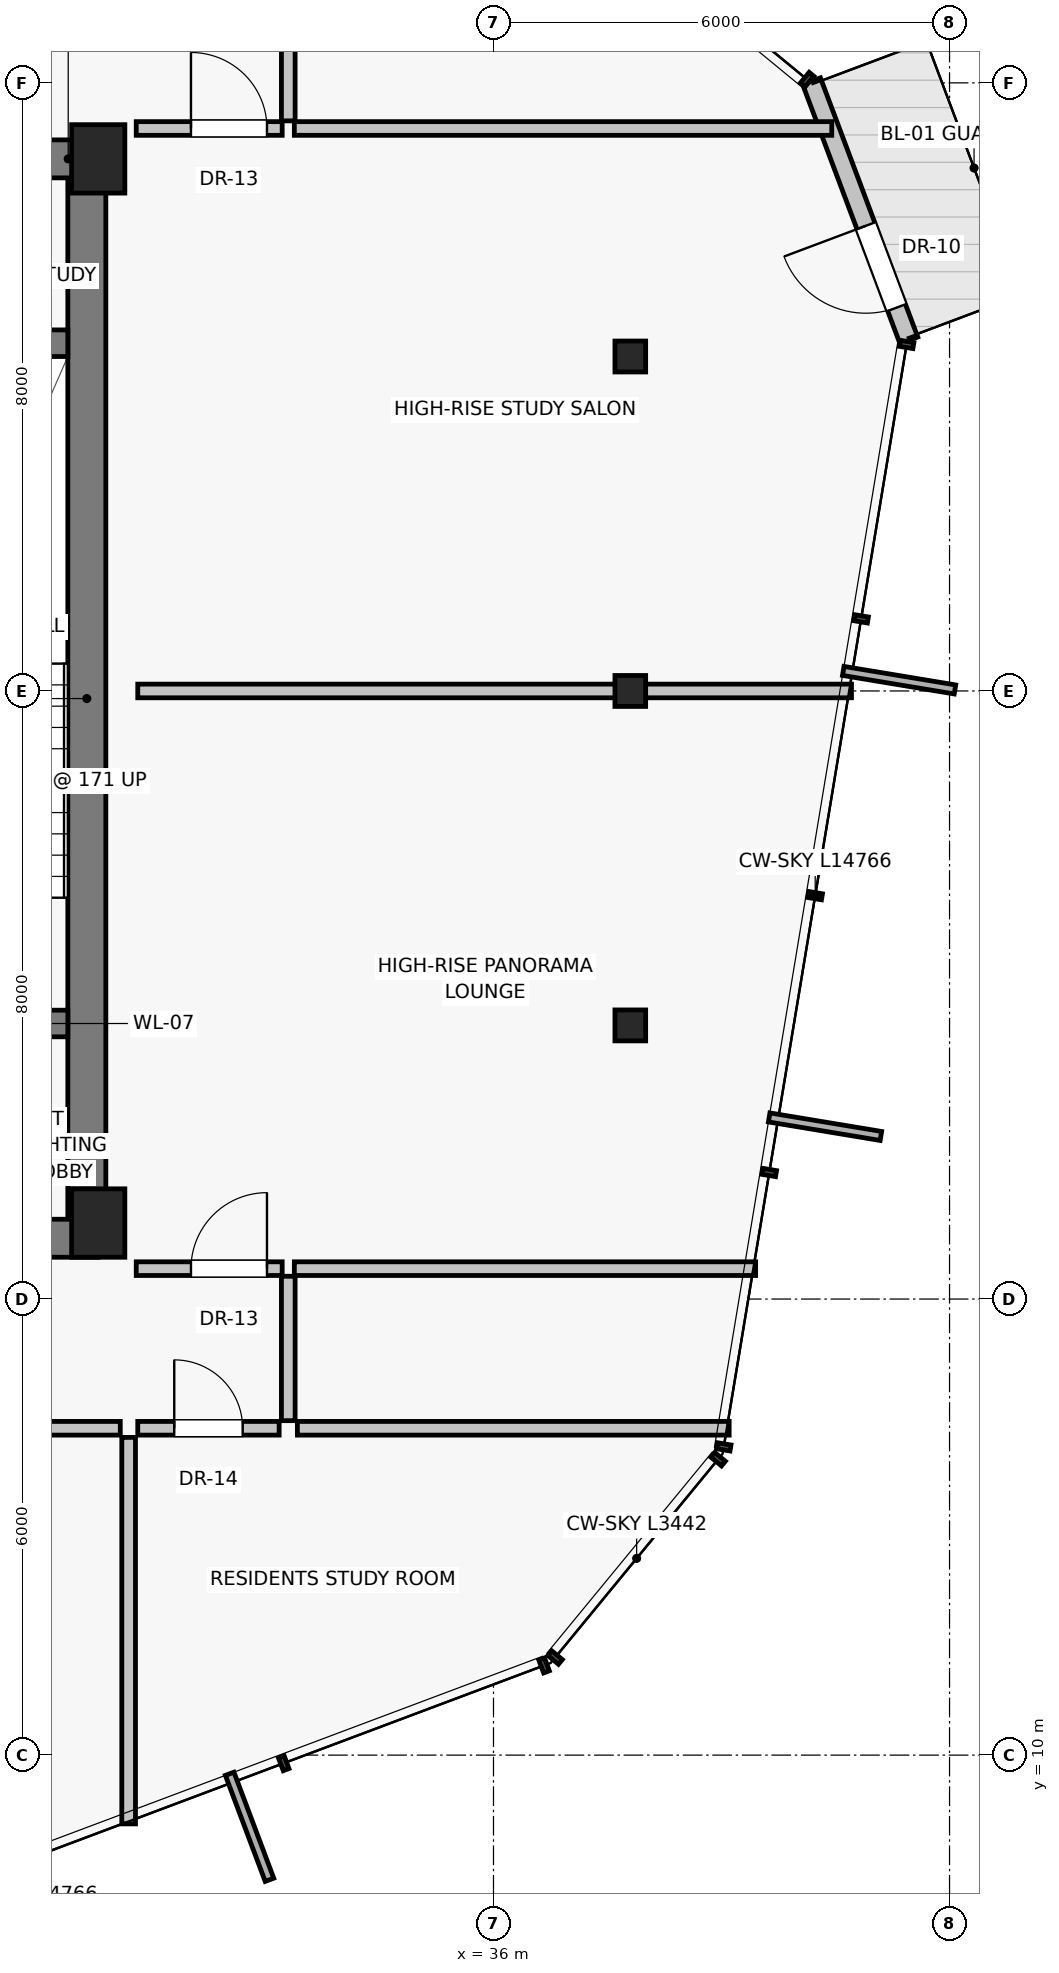
"""IFC4 building model, lengths in metres.
Left out: names, types, materials, properties, quantities, classifications, styles, units other than length and angle.
Written with IfcOpenShell. Run it as: python <this file> out.ifc"""

import sys

from ifc_helpers import new_model, si_unit, direction, frame, frame_2d, origin, origin_2d, place, context, subcontext, project, spatial, rectangle, i_section, extrude, source, transform, mapped, element, fill, save


model = new_model("IFC4")
c1 = context("Model", 3, precision=1e-05, world=origin(), true_north=direction((0.0, 1.0)))
c2 = subcontext(c1, "Body", "Model", "MODEL_VIEW")
j1 = project(units=[si_unit("LENGTHUNIT", "METRE"), si_unit("PLANEANGLEUNIT", "RADIAN")], contexts=[c1])
p1 = place(None, origin())
s1 = spatial("IfcSite", under=j1, at=p1, CompositionType="ELEMENT")
p2 = place(p1, origin())
s2 = spatial("IfcBuilding", under=s1, at=p2, CompositionType="ELEMENT")
p3 = place(p2, frame((0.0, 0.0, 240.65)))
s3 = spatial("IfcBuildingStorey", under=s2, at=p3, CompositionType="ELEMENT", Elevation=240.65)
for number, where, z_axis, x_axis in (
    (1, (30.8, 17.0, 0.0), (0.0, 0.0, 1.0), (1.0, 0.0, 0.0)),
    (2, (30.8, 31.0, 0.0), (0.0, 0.0, 1.0), (1.0, 0.0, 0.0)),
):
    element("IfcColumn", number, at=place(p3, frame(where, z_axis=z_axis, x_axis=x_axis)), inside=s3, PredefinedType="PILASTER", context=c2, shape_type="SweptSolid", body=[
        extrude(rectangle(XDim=0.7, YDim=0.9, at=origin_2d()), origin(), (0.0, 0.0, 1.0), 4.1),
    ])
for number, where, z_axis, x_axis in (
    (3, (37.8, 19.6, 0.0), (0.0, 0.0, 1.0), (1.0, 0.0, 0.0)),
    (4, (37.8, 24.0, 0.0), (0.0, 0.0, 1.0), (1.0, 0.0, 0.0)),
    (5, (37.8, 28.4, 0.0), (0.0, 0.0, 1.0), (1.0, 0.0, 0.0)),
):
    element("IfcColumn", number, at=place(p3, frame(where, z_axis=z_axis, x_axis=x_axis)), inside=s3, PredefinedType="COLUMN", context=c2, shape_type="SweptSolid", body=[
        extrude(i_section(OverallWidth=0.404, OverallDepth=0.407, WebThickness=0.025, FlangeThickness=0.04, at=origin_2d()), origin(), (0.0, 0.0, 1.0), 4.1),
    ])
p4 = place(p3, frame((41.465, 28.612, 0.0), z_axis=(0.0, 0.0, 1.0), x_axis=(-0.351498039149, 0.936188618001, 0.0)))
e6 = element("IfcWall", 6, at=p4, inside=s3, PredefinedType="SOLIDWALL", context=c2, shape_type="SweptSolid", body=[
    extrude(rectangle(XDim=3.642, YDim=0.25, at=frame_2d((1.821, 0.0))), origin(), (0.0, 0.0, 1.0), 3.865),
])
p5 = place(p4, frame((0.46, 0.0, 0.0)))
e7 = element("IfcOpeningElement", 7, at=p5, cuts=e6, PredefinedType="OPENING", context=c2, shape_type="SweptSolid", body=[
    extrude(rectangle(XDim=1.15, YDim=2.25, at=frame_2d((0.575, 1.125))), frame((0.0, 0.135, 0.0), z_axis=(0.0, -1.0, 0.0), x_axis=(1.0, 0.0, 0.0)), (0.0, 0.0, 1.0), 0.27),
])
p6 = place(p3, frame((30.65, 16.8, 0.0), z_axis=(0.0, 0.0, 1.0), x_axis=(0.0, 1.0, 0.0)))
e8 = element("IfcWall", 8, at=p6, inside=s3, PredefinedType="SHEAR", context=c2, shape_type="SweptSolid", body=[
    extrude(rectangle(XDim=14.2, YDim=0.5, at=frame_2d((7.1, 0.0))), origin(), (0.0, 0.0, 1.0), 3.865),
])
p7 = place(p3, frame((24.95, 16.8, 0.0), z_axis=(0.0, 0.0, 1.0), x_axis=(1.0, 0.0, 0.0)))
e9 = element("IfcWall", 9, at=p7, inside=s3, PredefinedType="SHEAR", context=c2, shape_type="SweptSolid", body=[
    extrude(rectangle(XDim=5.85, YDim=0.5, at=frame_2d((2.925, 0.0))), origin(), (0.0, 0.0, 1.0), 3.865),
])
p8 = place(p7, frame((2.15, 0.0, 0.0)))
e10 = element("IfcOpeningElement", 10, at=p8, cuts=e9, PredefinedType="OPENING", context=c2, shape_type="SweptSolid", body=[
    extrude(rectangle(XDim=1.2, YDim=2.03, at=frame_2d((0.6, 1.015))), frame((0.0, 0.26, 0.0), z_axis=(0.0, -1.0, 0.0), x_axis=(1.0, 0.0, 0.0)), (0.0, 0.0, 1.0), 0.52),
])
p9 = place(p3, frame((27.0, 31.0, 0.0), z_axis=(0.0, 0.0, 1.0), x_axis=(1.0, 0.0, 0.0)))
e11 = element("IfcWall", 11, at=p9, inside=s3, PredefinedType="SHEAR", context=c2, shape_type="SweptSolid", body=[
    extrude(rectangle(XDim=3.8, YDim=0.5, at=frame_2d((1.9, 0.0))), origin(), (0.0, 0.0, 1.0), 3.865),
])
p10 = place(p9, frame((0.45, 0.0, 0.0)))
e12 = element("IfcOpeningElement", 12, at=p10, cuts=e11, PredefinedType="OPENING", context=c2, shape_type="SweptSolid", body=[
    extrude(rectangle(XDim=0.86, YDim=2.01, at=frame_2d((0.43, 1.005))), frame((0.0, 0.26, 0.0), z_axis=(0.0, -1.0, 0.0), x_axis=(1.0, 0.0, 0.0)), (0.0, 0.0, 1.0), 0.52),
])
p11 = place(p9, frame((1.9, 0.0, 0.0)))
e13 = element("IfcOpeningElement", 13, at=p11, cuts=e11, PredefinedType="OPENING", context=c2, shape_type="SweptSolid", body=[
    extrude(rectangle(XDim=0.86, YDim=2.01, at=frame_2d((0.43, 1.005))), frame((0.0, 0.26, 0.0), z_axis=(0.0, -1.0, 0.0), x_axis=(1.0, 0.0, 0.0)), (0.0, 0.0, 1.0), 0.52),
])
p12 = place(p3, frame((27.025, 19.625, 0.0), z_axis=(0.0, 0.0, 1.0), x_axis=(1.0, 0.0, 0.0)))
e14 = element("IfcWall", 14, at=p12, inside=s3, PredefinedType="SHEAR", context=c2, shape_type="SweptSolid", body=[
    extrude(rectangle(XDim=3.375, YDim=0.35, at=frame_2d((1.688, 0.0))), origin(), (0.0, 0.0, 1.0), 3.865),
])
p13 = place(p12, frame((1.05, 0.0, 0.0)))
e15 = element("IfcOpeningElement", 15, at=p13, cuts=e14, PredefinedType="OPENING", context=c2, shape_type="SweptSolid", body=[
    extrude(rectangle(XDim=1.1, YDim=2.03, at=frame_2d((0.55, 1.015))), frame((0.0, 0.185, 0.0), z_axis=(0.0, -1.0, 0.0), x_axis=(1.0, 0.0, 0.0)), (0.0, 0.0, 1.0), 0.37),
])
p14 = place(p3, frame((27.025, 28.575, 0.0), z_axis=(0.0, 0.0, 1.0), x_axis=(1.0, 0.0, 0.0)))
e16 = element("IfcWall", 16, at=p14, inside=s3, PredefinedType="SHEAR", context=c2, shape_type="SweptSolid", body=[
    extrude(rectangle(XDim=3.375, YDim=0.35, at=frame_2d((1.688, 0.0))), origin(), (0.0, 0.0, 1.0), 3.865),
])
p15 = place(p3, frame((31.2, 14.18, 0.0), z_axis=(0.0, 0.0, 1.0), x_axis=(0.0, -1.0, 0.0)))
e17 = element("IfcWall", 17, at=p15, inside=s3, PredefinedType="PARTITIONING", context=c2, shape_type="SweptSolid", body=[
    extrude(rectangle(XDim=5.085, YDim=0.18, at=frame_2d((2.542, 0.0))), origin(), (0.0, 0.0, 1.0), 3.865),
])
p16 = place(p3, frame((24.43, 14.3, 0.0), z_axis=(0.0, 0.0, 1.0), x_axis=(1.0, 0.0, 0.0)))
e18 = element("IfcWall", 18, at=p16, inside=s3, PredefinedType="PARTITIONING", context=c2, shape_type="SweptSolid", body=[
    extrude(rectangle(XDim=6.66, YDim=0.18, at=frame_2d((3.33, 0.0))), origin(), (0.0, 0.0, 1.0), 3.865),
])
p17 = place(p16, frame((2.83, 0.0, 0.0)))
e19 = element("IfcOpeningElement", 19, at=p17, cuts=e18, PredefinedType="OPENING", context=c2, shape_type="SweptSolid", body=[
    extrude(rectangle(XDim=1.0, YDim=2.01, at=frame_2d((0.5, 1.005))), frame((0.0, 0.1, 0.0), z_axis=(0.0, -1.0, 0.0), x_axis=(1.0, 0.0, 0.0)), (0.0, 0.0, 1.0), 0.2),
])
p18 = place(p3, frame((31.32, 24.0, 0.0), z_axis=(0.0, 0.0, 1.0), x_axis=(1.0, 0.0, 0.0)))
e20 = element("IfcWall", 20, at=p18, inside=s3, PredefinedType="PARTITIONING", context=c2, shape_type="SweptSolid", body=[
    extrude(rectangle(XDim=9.39, YDim=0.18, at=frame_2d((4.695, 0.0))), origin(), (0.0, 0.0, 1.0), 3.865),
])
p19 = place(p3, frame((33.3, 14.4, 0.0), z_axis=(0.0, 0.0, 1.0), x_axis=(0.0, 1.0, 0.0)))
e21 = element("IfcWall", 21, at=p19, inside=s3, PredefinedType="PARTITIONING", context=c2, shape_type="SweptSolid", body=[
    extrude(rectangle(XDim=1.9, YDim=0.18, at=frame_2d((0.95, 0.0))), origin(), (0.0, 0.0, 1.0), 3.865),
])
p20 = place(p3, frame((33.3, 31.5, 0.0), z_axis=(0.0, 0.0, 1.0), x_axis=(0.0, 1.0, 0.0)))
e22 = element("IfcWall", 22, at=p20, inside=s3, PredefinedType="PARTITIONING", context=c2, shape_type="SweptSolid", body=[
    extrude(rectangle(XDim=1.9, YDim=0.18, at=frame_2d((0.95, 0.0))), origin(), (0.0, 0.0, 1.0), 3.865),
])
p21 = place(p3, frame((31.3, 16.4, 0.0), z_axis=(0.0, 0.0, 1.0), x_axis=(1.0, 0.0, 0.0)))
e23 = element("IfcWall", 23, at=p21, inside=s3, PredefinedType="PARTITIONING", context=c2, shape_type="SweptSolid", body=[
    extrude(rectangle(XDim=1.92, YDim=0.18, at=frame_2d((0.96, 0.0))), origin(), (0.0, 0.0, 1.0), 3.865),
])
p22 = place(p21, frame((0.72, 0.0, 0.0)))
e24 = element("IfcOpeningElement", 24, at=p22, cuts=e23, PredefinedType="OPENING", context=c2, shape_type="SweptSolid", body=[
    extrude(rectangle(XDim=1.0, YDim=2.01, at=frame_2d((0.5, 1.005))), frame((0.0, 0.1, 0.0), z_axis=(0.0, -1.0, 0.0), x_axis=(1.0, 0.0, 0.0)), (0.0, 0.0, 1.0), 0.2),
])
p23 = place(p3, frame((33.38, 16.4, 0.0), z_axis=(0.0, 0.0, 1.0), x_axis=(1.0, 0.0, 0.0)))
e25 = element("IfcWall", 25, at=p23, inside=s3, PredefinedType="PARTITIONING", context=c2, shape_type="SweptSolid", body=[
    extrude(rectangle(XDim=6.069, YDim=0.18, at=frame_2d((3.035, 0.0))), origin(), (0.0, 0.0, 1.0), 3.865),
])
p24 = place(p3, frame((31.3, 31.4, 0.0), z_axis=(0.0, 0.0, 1.0), x_axis=(1.0, 0.0, 0.0)))
e26 = element("IfcWall", 26, at=p24, inside=s3, PredefinedType="PARTITIONING", context=c2, shape_type="SweptSolid", body=[
    extrude(rectangle(XDim=1.92, YDim=0.18, at=frame_2d((0.96, 0.0))), origin(), (0.0, 0.0, 1.0), 3.865),
])
p25 = place(p24, frame((0.72, 0.0, 0.0)))
e27 = element("IfcOpeningElement", 27, at=p25, cuts=e26, PredefinedType="OPENING", context=c2, shape_type="SweptSolid", body=[
    extrude(rectangle(XDim=1.0, YDim=2.01, at=frame_2d((0.5, 1.005))), frame((0.0, 0.1, 0.0), z_axis=(0.0, -1.0, 0.0), x_axis=(1.0, 0.0, 0.0)), (0.0, 0.0, 1.0), 0.2),
])
p26 = place(p3, frame((33.38, 31.4, 0.0), z_axis=(0.0, 0.0, 1.0), x_axis=(1.0, 0.0, 0.0)))
e28 = element("IfcWall", 28, at=p26, inside=s3, PredefinedType="PARTITIONING", context=c2, shape_type="SweptSolid", body=[
    extrude(rectangle(XDim=7.07, YDim=0.18, at=frame_2d((3.535, 0.0))), origin(), (0.0, 0.0, 1.0), 3.865),
])
p27 = place(p3, frame((33.42, 14.3, 0.0), z_axis=(0.0, 0.0, 1.0), x_axis=(1.0, 0.0, 0.0)))
e29 = element("IfcWall", 29, at=p27, inside=s3, PredefinedType="PARTITIONING", context=c2, shape_type="SweptSolid", body=[
    extrude(rectangle(XDim=5.681, YDim=0.18, at=frame_2d((2.84, 0.0))), origin(), (0.0, 0.0, 1.0), 3.865),
])
p28 = place(p3, frame((31.32, 14.3, 0.0), z_axis=(0.0, 0.0, 1.0), x_axis=(1.0, 0.0, 0.0)))
e30 = element("IfcWall", 30, at=p28, inside=s3, PredefinedType="PARTITIONING", context=c2, shape_type="SweptSolid", body=[
    extrude(rectangle(XDim=1.86, YDim=0.18, at=frame_2d((0.93, 0.0))), origin(), (0.0, 0.0, 1.0), 3.865),
])
p29 = place(p28, frame((0.48, 0.0, 0.0)))
e31 = element("IfcOpeningElement", 31, at=p29, cuts=e30, PredefinedType="OPENING", context=c2, shape_type="SweptSolid", body=[
    extrude(rectangle(XDim=0.9, YDim=2.01, at=frame_2d((0.45, 1.005))), frame((0.0, 0.1, 0.0), z_axis=(0.0, -1.0, 0.0), x_axis=(1.0, 0.0, 0.0)), (0.0, 0.0, 1.0), 0.2),
])
m1 = source(origin(), c2, "Body", "SweptSolid", [
    extrude(rectangle(XDim=1.15, YDim=2.25, at=frame_2d((0.575, 1.125))), frame((0.0, 0.025, 0.0), z_axis=(0.0, -1.0, 0.0), x_axis=(1.0, 0.0, 0.0)), (0.0, 0.0, 1.0), 0.05),
])
p30 = place(p5, frame((1.15, 0.0, 0.0), z_axis=(0.0, 0.0, 1.0), x_axis=(-1.0, 0.0, 0.0)))
e32 = element("IfcDoor", 32, at=p30, inside=s3, OperationType="SINGLE_SWING_RIGHT", PredefinedType="DOOR", context=c2, shape_type="MappedRepresentation", body=[
    mapped(m1, transform((0.0, 0.0, 0.0), scale=1.0)),
])
fill(e7, e32)
m2 = source(origin(), c2, "Body", "SweptSolid", [
    extrude(rectangle(XDim=1.0, YDim=2.01, at=frame_2d((0.5, 1.005))), frame((0.0, 0.025, 0.0), z_axis=(0.0, -1.0, 0.0), x_axis=(1.0, 0.0, 0.0)), (0.0, 0.0, 1.0), 0.05),
])
p31 = place(p22, origin())
e33 = element("IfcDoor", 33, at=p31, inside=s3, OperationType="SINGLE_SWING_RIGHT", PredefinedType="DOOR", context=c2, shape_type="MappedRepresentation", body=[
    mapped(m2, transform((0.0, 0.0, 0.0), scale=1.0)),
])
fill(e24, e33)
p32 = place(p25, origin())
e34 = element("IfcDoor", 34, at=p32, inside=s3, OperationType="SINGLE_SWING_LEFT", PredefinedType="DOOR", context=c2, shape_type="MappedRepresentation", body=[
    mapped(m2, transform((0.0, 0.0, 0.0), scale=1.0)),
])
fill(e27, e34)
m3 = source(origin(), c2, "Body", "SweptSolid", [
    extrude(rectangle(XDim=0.9, YDim=2.01, at=frame_2d((0.45, 1.005))), frame((0.0, 0.025, 0.0), z_axis=(0.0, -1.0, 0.0), x_axis=(1.0, 0.0, 0.0)), (0.0, 0.0, 1.0), 0.05),
])
p33 = place(p29, origin())
e35 = element("IfcDoor", 35, at=p33, inside=s3, OperationType="SINGLE_SWING_LEFT", PredefinedType="DOOR", context=c2, shape_type="MappedRepresentation", body=[
    mapped(m3, transform((0.0, 0.0, 0.0), scale=1.0)),
])
fill(e31, e35)
save(model, sys.argv[1])
